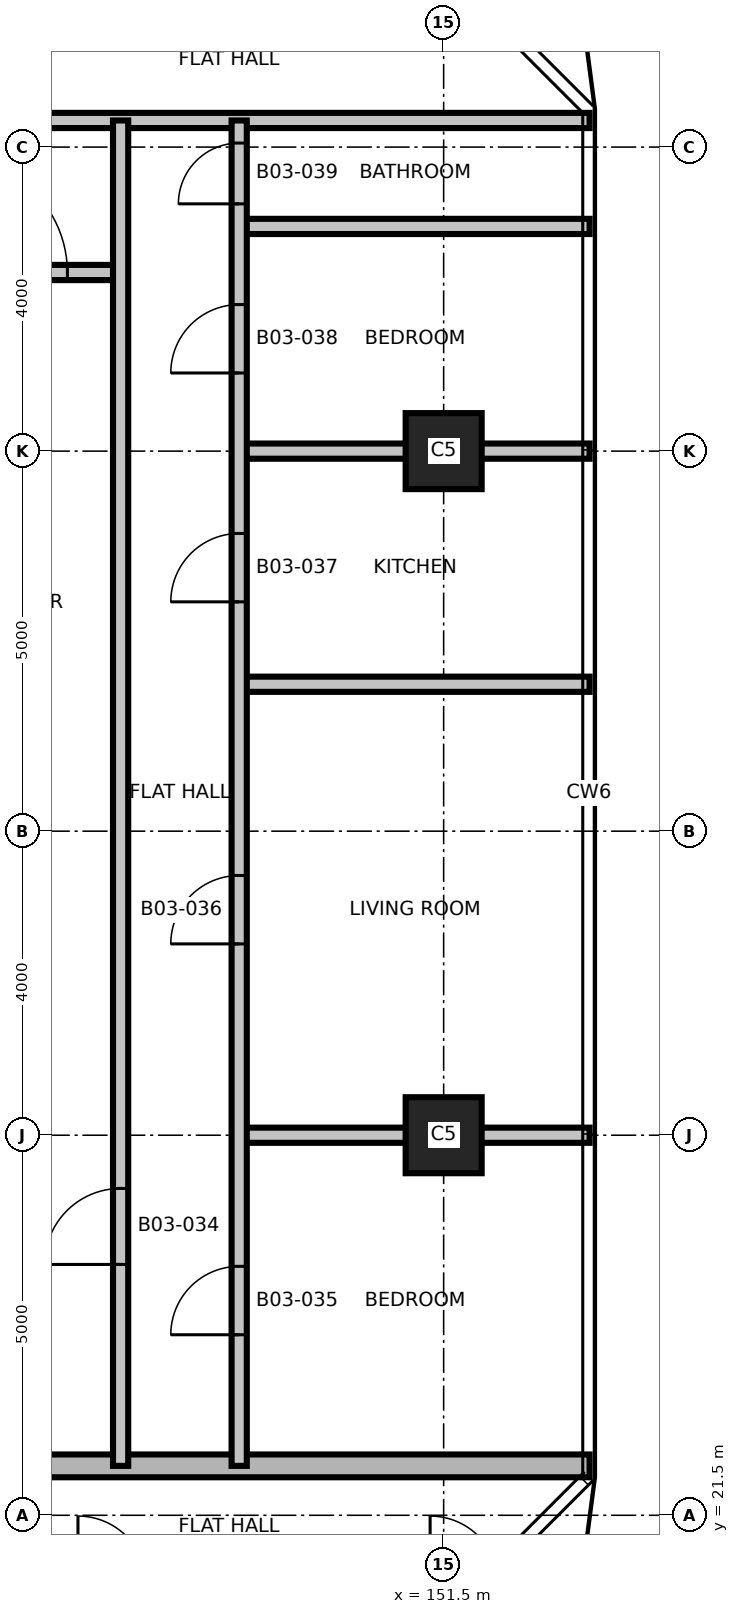
"""IFC4 building model, lengths in metres.
Left out: names, types, materials, properties, quantities, classifications, styles, units other than length and angle.
Written with IfcOpenShell. Run it as: python <this file> out.ifc"""

import sys

from ifc_helpers import new_model, si_unit, direction, frame, frame_2d, origin, origin_2d, place, context, subcontext, project, spatial, rectangle, extrude, element, fill, save


model = new_model("IFC4")
c1 = context("Model", 3, precision=1e-05, world=origin(), true_north=direction((0.0, 1.0)))
c2 = subcontext(c1, "Body", "Model", "MODEL_VIEW")
j1 = project(units=[si_unit("LENGTHUNIT", "METRE"), si_unit("PLANEANGLEUNIT", "RADIAN")], contexts=[c1])
p1 = place(None, origin())
s1 = spatial("IfcSite", under=j1, at=p1, CompositionType="ELEMENT")
p2 = place(p1, origin())
s2 = spatial("IfcBuilding", under=s1, at=p2, CompositionType="ELEMENT")
p3 = place(p2, frame((0.0, 0.0, 55.7)))
s3 = spatial("IfcBuildingStorey", under=s2, at=p3, CompositionType="ELEMENT", Elevation=55.7)
for number, where, z_axis, x_axis in (
    (1, (151.5, 26.5, 0.0), (0.0, 0.0, 1.0), (1.0, 0.0, 0.0)),
    (2, (151.5, 35.5, 0.0), (0.0, 0.0, 1.0), (1.0, 0.0, 0.0)),
):
    element("IfcColumn", number, at=place(p3, frame(where, z_axis=z_axis, x_axis=x_axis)), inside=s3, PredefinedType="COLUMN", context=c2, shape_type="SweptSolid", body=[
        extrude(rectangle(XDim=1.0, YDim=1.0, at=origin_2d()), origin(), (0.0, 0.0, 1.0), 3.7),
    ])
p4 = place(p3, frame((119.58, 22.15, 0.0), z_axis=(0.0, 0.0, 1.0), x_axis=(1.0, 0.0, 0.0)))
e3 = element("IfcWall", 3, at=p4, inside=s3, PredefinedType="SHEAR", context=c2, shape_type="SweptSolid", body=[
    extrude(rectangle(XDim=33.84, YDim=0.3, at=frame_2d((16.92, 0.0))), origin(), (0.0, 0.0, 1.0), 3.4),
])
p5 = place(p4, frame((23.17, 0.0, 0.0)))
e4 = element("IfcOpeningElement", 4, at=p5, cuts=e3, PredefinedType="OPENING", context=c2, shape_type="SweptSolid", body=[
    extrude(rectangle(XDim=1.0, YDim=2.1, at=frame_2d((0.5, 1.05))), frame((0.0, 0.16, 0.0), z_axis=(0.0, -1.0, 0.0), x_axis=(1.0, 0.0, 0.0)), (0.0, 0.0, 1.0), 0.32),
])
p6 = place(p4, frame((11.52, 0.0, 0.0)))
e5 = element("IfcOpeningElement", 5, at=p6, cuts=e3, PredefinedType="OPENING", context=c2, shape_type="SweptSolid", body=[
    extrude(rectangle(XDim=1.0, YDim=2.1, at=frame_2d((0.5, 1.05))), frame((0.0, 0.16, 0.0), z_axis=(0.0, -1.0, 0.0), x_axis=(1.0, 0.0, 0.0)), (0.0, 0.0, 1.0), 0.32),
])
p7 = place(p4, frame((25.07, 0.0, 0.0)))
e6 = element("IfcOpeningElement", 6, at=p7, cuts=e3, PredefinedType="OPENING", context=c2, shape_type="SweptSolid", body=[
    extrude(rectangle(XDim=1.0, YDim=2.1, at=frame_2d((0.5, 1.05))), frame((0.0, 0.16, 0.0), z_axis=(0.0, -1.0, 0.0), x_axis=(1.0, 0.0, 0.0)), (0.0, 0.0, 1.0), 0.32),
])
p8 = place(p4, frame((17.17, 0.0, 0.0)))
e7 = element("IfcOpeningElement", 7, at=p8, cuts=e3, PredefinedType="OPENING", context=c2, shape_type="SweptSolid", body=[
    extrude(rectangle(XDim=0.9, YDim=2.1, at=frame_2d((0.45, 1.05))), frame((0.0, 0.16, 0.0), z_axis=(0.0, -1.0, 0.0), x_axis=(1.0, 0.0, 0.0)), (0.0, 0.0, 1.0), 0.32),
])
for number, where, z_axis, x_axis in (
    (8, (148.81, 26.5, 0.0), (0.0, 0.0, 1.0), (1.0, 0.0, 0.0)),
    (9, (148.81, 32.433, 0.0), (0.0, 0.0, 1.0), (1.0, 0.0, 0.0)),
    (10, (148.81, 35.5, 0.0), (0.0, 0.0, 1.0), (1.0, 0.0, 0.0)),
):
    element("IfcWall", number, at=place(p3, frame(where, z_axis=z_axis, x_axis=x_axis)), inside=s3, PredefinedType="PARTITIONING", context=c2, shape_type="SweptSolid", body=[
        extrude(rectangle(XDim=4.61, YDim=0.2, at=frame_2d((2.305, 0.0))), origin(), (0.0, 0.0, 1.0), 3.4),
    ])
p9 = place(p3, frame((144.02, 37.85, 0.0), z_axis=(0.0, 0.0, 1.0), x_axis=(1.0, 0.0, 0.0)))
e11 = element("IfcWall", 11, at=p9, inside=s3, PredefinedType="PARTITIONING", context=c2, shape_type="SweptSolid", body=[
    extrude(rectangle(XDim=3.23, YDim=0.2, at=frame_2d((1.615, 0.0))), origin(), (0.0, 0.0, 1.0), 3.4),
])
p10 = place(p9, frame((1.03, 0.0, 0.0)))
e12 = element("IfcOpeningElement", 12, at=p10, cuts=e11, PredefinedType="OPENING", context=c2, shape_type="SweptSolid", body=[
    extrude(rectangle(XDim=1.5, YDim=2.1, at=frame_2d((0.75, 1.05))), frame((0.0, 0.11, 0.0), z_axis=(0.0, -1.0, 0.0), x_axis=(1.0, 0.0, 0.0)), (0.0, 0.0, 1.0), 0.22),
])
p11 = place(p3, frame((148.81, 38.456, 0.0), z_axis=(0.0, 0.0, 1.0), x_axis=(1.0, 0.0, 0.0)))
e13 = element("IfcWall", 13, at=p11, inside=s3, PredefinedType="PARTITIONING", context=c2, shape_type="SweptSolid", body=[
    extrude(rectangle(XDim=4.61, YDim=0.2, at=frame_2d((2.305, 0.0))), origin(), (0.0, 0.0, 1.0), 3.4),
])
p12 = place(p3, frame((119.58, 39.85, 0.0), z_axis=(0.0, 0.0, 1.0), x_axis=(1.0, 0.0, 0.0)))
e14 = element("IfcWall", 14, at=p12, inside=s3, PredefinedType="PARTITIONING", context=c2, shape_type="SweptSolid", body=[
    extrude(rectangle(XDim=33.84, YDim=0.2, at=frame_2d((16.92, 0.0))), origin(), (0.0, 0.0, 1.0), 3.4),
])
p13 = place(p12, frame((15.27, 0.0, 0.0)))
e15 = element("IfcOpeningElement", 15, at=p13, cuts=e14, PredefinedType="OPENING", context=c2, shape_type="SweptSolid", body=[
    extrude(rectangle(XDim=1.0, YDim=2.1, at=frame_2d((0.5, 1.05))), frame((0.0, 0.11, 0.0), z_axis=(0.0, -1.0, 0.0), x_axis=(1.0, 0.0, 0.0)), (0.0, 0.0, 1.0), 0.22),
])
p14 = place(p12, frame((25.07, 0.0, 0.0)))
e16 = element("IfcOpeningElement", 16, at=p14, cuts=e14, PredefinedType="OPENING", context=c2, shape_type="SweptSolid", body=[
    extrude(rectangle(XDim=1.0, YDim=2.1, at=frame_2d((0.5, 1.05))), frame((0.0, 0.11, 0.0), z_axis=(0.0, -1.0, 0.0), x_axis=(1.0, 0.0, 0.0)), (0.0, 0.0, 1.0), 0.22),
])
p15 = place(p3, frame((147.25, 22.15, 0.0), z_axis=(0.0, 0.0, 1.0), x_axis=(0.0, 1.0, 0.0)))
e17 = element("IfcWall", 17, at=p15, inside=s3, PredefinedType="PARTITIONING", context=c2, shape_type="SweptSolid", body=[
    extrude(rectangle(XDim=17.7, YDim=0.2, at=frame_2d((8.85, 0.0))), origin(), (0.0, 0.0, 1.0), 3.4),
])
p16 = place(p15, frame((2.65, 0.0, 0.0)))
e18 = element("IfcOpeningElement", 18, at=p16, cuts=e17, PredefinedType="OPENING", context=c2, shape_type="SweptSolid", body=[
    extrude(rectangle(XDim=1.0, YDim=2.1, at=frame_2d((0.5, 1.05))), frame((0.0, 0.11, 0.0), z_axis=(0.0, -1.0, 0.0), x_axis=(1.0, 0.0, 0.0)), (0.0, 0.0, 1.0), 0.22),
])
p17 = place(p3, frame((148.81, 22.15, 0.0), z_axis=(0.0, 0.0, 1.0), x_axis=(0.0, 1.0, 0.0)))
e19 = element("IfcWall", 19, at=p17, inside=s3, PredefinedType="PARTITIONING", context=c2, shape_type="SweptSolid", body=[
    extrude(rectangle(XDim=17.7, YDim=0.2, at=frame_2d((8.85, 0.0))), origin(), (0.0, 0.0, 1.0), 3.4),
])
p18 = place(p17, frame((1.725, 0.0, 0.0)))
e20 = element("IfcOpeningElement", 20, at=p18, cuts=e19, PredefinedType="OPENING", context=c2, shape_type="SweptSolid", body=[
    extrude(rectangle(XDim=0.9, YDim=2.1, at=frame_2d((0.45, 1.05))), frame((0.0, 0.11, 0.0), z_axis=(0.0, -1.0, 0.0), x_axis=(1.0, 0.0, 0.0)), (0.0, 0.0, 1.0), 0.22),
])
p19 = place(p17, frame((6.867, 0.0, 0.0)))
e21 = element("IfcOpeningElement", 21, at=p19, cuts=e19, PredefinedType="OPENING", context=c2, shape_type="SweptSolid", body=[
    extrude(rectangle(XDim=0.9, YDim=2.1, at=frame_2d((0.45, 1.05))), frame((0.0, 0.11, 0.0), z_axis=(0.0, -1.0, 0.0), x_axis=(1.0, 0.0, 0.0)), (0.0, 0.0, 1.0), 0.22),
])
p20 = place(p17, frame((11.367, 0.0, 0.0)))
e22 = element("IfcOpeningElement", 22, at=p20, cuts=e19, PredefinedType="OPENING", context=c2, shape_type="SweptSolid", body=[
    extrude(rectangle(XDim=0.9, YDim=2.1, at=frame_2d((0.45, 1.05))), frame((0.0, 0.11, 0.0), z_axis=(0.0, -1.0, 0.0), x_axis=(1.0, 0.0, 0.0)), (0.0, 0.0, 1.0), 0.22),
])
p21 = place(p17, frame((14.378, 0.0, 0.0)))
e23 = element("IfcOpeningElement", 23, at=p21, cuts=e19, PredefinedType="OPENING", context=c2, shape_type="SweptSolid", body=[
    extrude(rectangle(XDim=0.9, YDim=2.1, at=frame_2d((0.45, 1.05))), frame((0.0, 0.11, 0.0), z_axis=(0.0, -1.0, 0.0), x_axis=(1.0, 0.0, 0.0)), (0.0, 0.0, 1.0), 0.22),
])
p22 = place(p17, frame((16.603, 0.0, 0.0)))
e24 = element("IfcOpeningElement", 24, at=p22, cuts=e19, PredefinedType="OPENING", context=c2, shape_type="SweptSolid", body=[
    extrude(rectangle(XDim=0.8, YDim=2.1, at=frame_2d((0.4, 1.05))), frame((0.0, 0.11, 0.0), z_axis=(0.0, -1.0, 0.0), x_axis=(1.0, 0.0, 0.0)), (0.0, 0.0, 1.0), 0.22),
])
p23 = place(p10, origin())
e25 = element("IfcDoor", 25, at=p23, inside=s3, OperationType="SINGLE_SWING_LEFT", PredefinedType="DOOR", context=c2, shape_type="SweptSolid", body=[
    extrude(rectangle(XDim=1.5, YDim=2.1, at=frame_2d((0.75, 1.05))), frame((0.0, 0.025, 0.0), z_axis=(0.0, -1.0, 0.0), x_axis=(1.0, 0.0, 0.0)), (0.0, 0.0, 1.0), 0.05),
])
fill(e12, e25)
p24 = place(p16, origin())
e26 = element("IfcDoor", 26, at=p24, inside=s3, OperationType="SINGLE_SWING_RIGHT", PredefinedType="DOOR", context=c2, shape_type="SweptSolid", body=[
    extrude(rectangle(XDim=1.0, YDim=2.1, at=frame_2d((0.5, 1.05))), frame((0.0, 0.025, 0.0), z_axis=(0.0, -1.0, 0.0), x_axis=(1.0, 0.0, 0.0)), (0.0, 0.0, 1.0), 0.05),
])
fill(e18, e26)
p25 = place(p18, origin())
e27 = element("IfcDoor", 27, at=p25, inside=s3, OperationType="SINGLE_SWING_LEFT", PredefinedType="DOOR", context=c2, shape_type="SweptSolid", body=[
    extrude(rectangle(XDim=0.9, YDim=2.1, at=frame_2d((0.45, 1.05))), frame((0.0, 0.025, 0.0), z_axis=(0.0, -1.0, 0.0), x_axis=(1.0, 0.0, 0.0)), (0.0, 0.0, 1.0), 0.05),
])
fill(e20, e27)
p26 = place(p19, origin())
e28 = element("IfcDoor", 28, at=p26, inside=s3, OperationType="SINGLE_SWING_RIGHT", PredefinedType="DOOR", context=c2, shape_type="SweptSolid", body=[
    extrude(rectangle(XDim=0.9, YDim=2.1, at=frame_2d((0.45, 1.05))), frame((0.0, 0.025, 0.0), z_axis=(0.0, -1.0, 0.0), x_axis=(1.0, 0.0, 0.0)), (0.0, 0.0, 1.0), 0.05),
])
fill(e21, e28)
p27 = place(p20, origin())
e29 = element("IfcDoor", 29, at=p27, inside=s3, OperationType="SINGLE_SWING_LEFT", PredefinedType="DOOR", context=c2, shape_type="SweptSolid", body=[
    extrude(rectangle(XDim=0.9, YDim=2.1, at=frame_2d((0.45, 1.05))), frame((0.0, 0.025, 0.0), z_axis=(0.0, -1.0, 0.0), x_axis=(1.0, 0.0, 0.0)), (0.0, 0.0, 1.0), 0.05),
])
fill(e22, e29)
p28 = place(p21, origin())
e30 = element("IfcDoor", 30, at=p28, inside=s3, OperationType="SINGLE_SWING_RIGHT", PredefinedType="DOOR", context=c2, shape_type="SweptSolid", body=[
    extrude(rectangle(XDim=0.9, YDim=2.1, at=frame_2d((0.45, 1.05))), frame((0.0, 0.025, 0.0), z_axis=(0.0, -1.0, 0.0), x_axis=(1.0, 0.0, 0.0)), (0.0, 0.0, 1.0), 0.05),
])
fill(e23, e30)
p29 = place(p22, origin())
e31 = element("IfcDoor", 31, at=p29, inside=s3, OperationType="SINGLE_SWING_LEFT", PredefinedType="DOOR", context=c2, shape_type="SweptSolid", body=[
    extrude(rectangle(XDim=0.8, YDim=2.1, at=frame_2d((0.4, 1.05))), frame((0.0, 0.025, 0.0), z_axis=(0.0, -1.0, 0.0), x_axis=(1.0, 0.0, 0.0)), (0.0, 0.0, 1.0), 0.05),
])
fill(e24, e31)
save(model, sys.argv[1])
